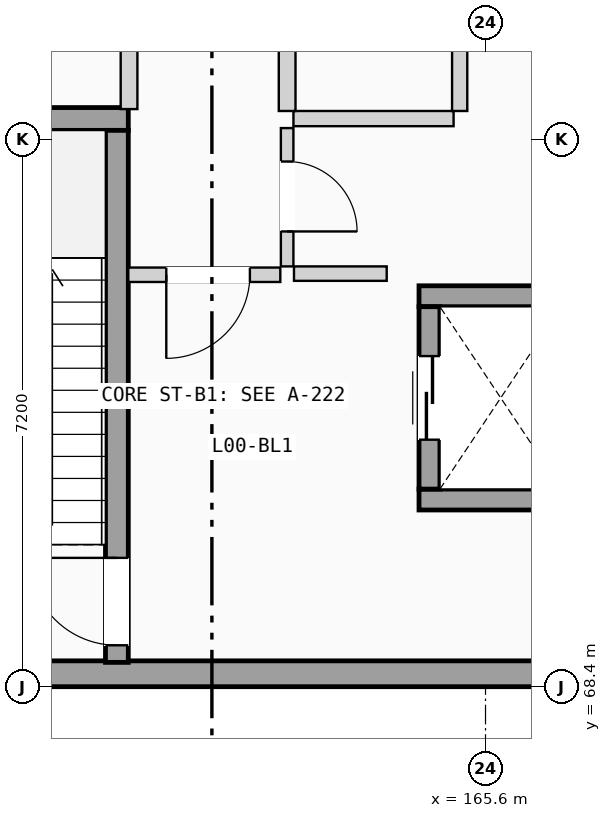
"""IFC4 building model, lengths in metres.
Left out: names, types, materials, properties, quantities, classifications, styles, units other than length and angle.
Written with IfcOpenShell. Run it as: python <this file> out.ifc"""

import sys

from ifc_helpers import new_model, si_unit, direction, frame, frame_2d, origin, place, context, subcontext, project, spatial, rectangle, extrude, element, fill, save


model = new_model("IFC4")
c1 = context("Model", 3, precision=1e-05, world=origin(), true_north=direction((0.0, 1.0)))
c2 = subcontext(c1, "Body", "Model", "MODEL_VIEW")
j1 = project(units=[si_unit("LENGTHUNIT", "METRE"), si_unit("PLANEANGLEUNIT", "RADIAN")], contexts=[c1])
p1 = place(None, origin())
s1 = spatial("IfcSite", under=j1, at=p1, CompositionType="ELEMENT")
p2 = place(p1, origin())
s2 = spatial("IfcBuilding", under=s1, at=p2, CompositionType="ELEMENT")
p3 = place(p2, origin())
s3 = spatial("IfcBuildingStorey", under=s2, at=p3, CompositionType="ELEMENT", Elevation=0.0)
p4 = place(p3, frame((151.2, 68.57, 0.0), z_axis=(0.0, 0.0, 1.0), x_axis=(1.0, 0.0, 0.0)))
e1 = element("IfcWall", 1, at=p4, inside=s3, PredefinedType="SOLIDWALL", context=c2, shape_type="SweptSolid", body=[
    extrude(rectangle(XDim=21.6, YDim=0.34, at=frame_2d((10.8, 0.0))), origin(), (0.0, 0.0, 1.0), 4.64),
])
p5 = place(p4, frame((7.25, 0.0, 0.0)))
e2 = element("IfcOpeningElement", 2, at=p5, cuts=e1, PredefinedType="OPENING", context=c2, shape_type="SweptSolid", body=[
    extrude(rectangle(XDim=1.3, YDim=2.2, at=frame_2d((0.65, 1.1))), frame((0.0, 0.18, 0.0), z_axis=(0.0, -1.0, 0.0), x_axis=(1.0, 0.0, 0.0)), (0.0, 0.0, 1.0), 0.36),
])
p6 = place(p3, frame((156.975, 75.87, 0.0), z_axis=(0.0, 0.0, 1.0), x_axis=(1.0, 0.0, 0.0)))
e3 = element("IfcWall", 3, at=p6, inside=s3, PredefinedType="SHEAR", context=c2, shape_type="SweptSolid", body=[
    extrude(rectangle(XDim=3.925, YDim=0.3, at=frame_2d((1.962, 0.0))), origin(), (0.0, 0.0, 1.0), 4.64),
])
p7 = place(p3, frame((160.75, 68.72, 0.0), z_axis=(0.0, 0.0, 1.0), x_axis=(0.0, 1.0, 0.0)))
e4 = element("IfcWall", 4, at=p7, inside=s3, PredefinedType="SHEAR", context=c2, shape_type="SweptSolid", body=[
    extrude(rectangle(XDim=7.0, YDim=0.3, at=frame_2d((3.5, 0.0))), origin(), (0.0, 0.0, 1.0), 4.64),
])
p8 = place(p7, frame((0.225, 0.0, 0.0)))
e5 = element("IfcOpeningElement", 5, at=p8, cuts=e4, PredefinedType="OPENING", context=c2, shape_type="SweptSolid", body=[
    extrude(rectangle(XDim=1.15, YDim=2.12, at=frame_2d((0.575, 1.06))), frame((0.0, 0.16, 0.0), z_axis=(0.0, -1.0, 0.0), x_axis=(1.0, 0.0, 0.0)), (0.0, 0.0, 1.0), 0.32),
])
for number, where, z_axis, x_axis in (
    (6, (164.725, 70.863, 0.0), (0.0, 0.0, 1.0), (1.0, 0.0, 0.0)),
    (7, (164.725, 73.538, 0.0), (0.0, 0.0, 1.0), (1.0, 0.0, 0.0)),
):
    element("IfcWall", number, at=place(p3, frame(where, z_axis=z_axis, x_axis=x_axis)), inside=s3, PredefinedType="SHEAR", context=c2, shape_type="SweptSolid", body=[
        extrude(rectangle(XDim=2.15, YDim=0.275, at=frame_2d((1.075, 0.0))), origin(), (0.0, 0.0, 1.0), 4.64),
    ])
p9 = place(p3, frame((164.863, 71.0, 0.0), z_axis=(0.0, 0.0, 1.0), x_axis=(0.0, 1.0, 0.0)))
e8 = element("IfcWall", 8, at=p9, inside=s3, PredefinedType="SHEAR", context=c2, shape_type="SweptSolid", body=[
    extrude(rectangle(XDim=2.4, YDim=0.275, at=frame_2d((1.2, 0.0))), origin(), (0.0, 0.0, 1.0), 4.64),
])
p10 = place(p9, frame((0.65, 0.0, 0.0)))
e9 = element("IfcOpeningElement", 9, at=p10, cuts=e8, PredefinedType="OPENING", context=c2, shape_type="SweptSolid", body=[
    extrude(rectangle(XDim=1.1, YDim=2.15, at=frame_2d((0.55, 1.075))), frame((0.0, 0.147, 0.0), z_axis=(0.0, -1.0, 0.0), x_axis=(1.0, 0.0, 0.0)), (0.0, 0.0, 1.0), 0.295),
])
p11 = place(p3, frame((163.08, 73.835, 0.0), z_axis=(0.0, 0.0, 1.0), x_axis=(1.0, 0.0, 0.0)))
e10 = element("IfcWall", 10, at=p11, inside=s3, PredefinedType="PARTITIONING", context=c2, shape_type="SweptSolid", body=[
    extrude(rectangle(XDim=1.22, YDim=0.19, at=frame_2d((0.61, 0.0))), origin(), (0.0, 0.0, 1.0), 3.84),
])
p12 = place(p3, frame((160.9, 73.82, 0.0), z_axis=(0.0, 0.0, 1.0), x_axis=(1.0, 0.0, 0.0)))
e11 = element("IfcWall", 11, at=p12, inside=s3, PredefinedType="PARTITIONING", context=c2, shape_type="SweptSolid", body=[
    extrude(rectangle(XDim=2.0, YDim=0.19, at=frame_2d((1.0, 0.0))), origin(), (0.0, 0.0, 1.0), 3.84),
])
p13 = place(p12, frame((0.5, 0.0, 0.0)))
e12 = element("IfcOpeningElement", 12, at=p13, cuts=e11, PredefinedType="OPENING", context=c2, shape_type="SweptSolid", body=[
    extrude(rectangle(XDim=1.1, YDim=2.12, at=frame_2d((0.55, 1.06))), frame((0.0, 0.105, 0.0), z_axis=(0.0, -1.0, 0.0), x_axis=(1.0, 0.0, 0.0)), (0.0, 0.0, 1.0), 0.21),
])
p14 = place(p3, frame((162.99, 73.93, 0.0), z_axis=(0.0, 0.0, 1.0), x_axis=(0.0, 1.0, 0.0)))
e13 = element("IfcWall", 13, at=p14, inside=s3, PredefinedType="PARTITIONING", context=c2, shape_type="SweptSolid", body=[
    extrude(rectangle(XDim=1.82, YDim=0.165, at=frame_2d((0.91, 0.0))), origin(), (0.0, 0.0, 1.0), 3.84),
])
p15 = place(p14, frame((0.46, 0.0, 0.0)))
e14 = element("IfcOpeningElement", 14, at=p15, cuts=e13, PredefinedType="OPENING", context=c2, shape_type="SweptSolid", body=[
    extrude(rectangle(XDim=0.92, YDim=2.04, at=frame_2d((0.46, 1.02))), frame((0.0, 0.093, 0.0), z_axis=(0.0, -1.0, 0.0), x_axis=(1.0, 0.0, 0.0)), (0.0, 0.0, 1.0), 0.185),
])
p16 = place(p3, frame((163.073, 75.875, 0.0), z_axis=(0.0, 0.0, 1.0), x_axis=(1.0, 0.0, 0.0)))
e15 = element("IfcWall", 15, at=p16, inside=s3, PredefinedType="PLUMBINGWALL", context=c2, shape_type="SweptSolid", body=[
    extrude(rectangle(XDim=2.107, YDim=0.2, at=frame_2d((1.053, 0.0))), origin(), (0.0, 0.0, 1.0), 3.84),
])
p17 = place(p3, frame((160.91, 76.0, 0.0), z_axis=(0.0, 0.0, 1.0), x_axis=(0.0, 1.0, 0.0)))
e16 = element("IfcWall", 16, at=p17, inside=s3, PredefinedType="PLUMBINGWALL", context=c2, shape_type="SweptSolid", body=[
    extrude(rectangle(XDim=3.493, YDim=0.22, at=frame_2d((1.747, 0.0))), origin(), (0.0, 0.0, 1.0), 3.84),
])
p18 = place(p3, frame((162.99, 75.975, 0.0), z_axis=(0.0, 0.0, 1.0), x_axis=(0.0, 1.0, 0.0)))
e17 = element("IfcWall", 17, at=p18, inside=s3, PredefinedType="PLUMBINGWALL", context=c2, shape_type="SweptSolid", body=[
    extrude(rectangle(XDim=3.518, YDim=0.22, at=frame_2d((1.759, 0.0))), origin(), (0.0, 0.0, 1.0), 3.84),
])
p19 = place(p3, frame((165.26, 75.975, 0.0), z_axis=(0.0, 0.0, 1.0), x_axis=(0.0, 1.0, 0.0)))
e18 = element("IfcWall", 18, at=p19, inside=s3, PredefinedType="PLUMBINGWALL", context=c2, shape_type="SweptSolid", body=[
    extrude(rectangle(XDim=3.518, YDim=0.2, at=frame_2d((1.759, 0.0))), origin(), (0.0, 0.0, 1.0), 3.84),
])
p20 = place(p8, origin())
e19 = element("IfcDoor", 19, at=p20, inside=s3, OperationType="SINGLE_SWING_RIGHT", PredefinedType="DOOR", context=c2, shape_type="SweptSolid", body=[
    extrude(rectangle(XDim=1.15, YDim=2.12, at=frame_2d((0.575, 1.06))), frame((0.0, 0.025, 0.0), z_axis=(0.0, -1.0, 0.0), x_axis=(1.0, 0.0, 0.0)), (0.0, 0.0, 1.0), 0.05),
])
fill(e5, e19)
p21 = place(p10, origin())
e20 = element("IfcDoor", 20, at=p21, inside=s3, OperationType="SLIDING_TO_LEFT", PredefinedType="DOOR", context=c2, shape_type="SweptSolid", body=[
    extrude(rectangle(XDim=1.1, YDim=2.15, at=frame_2d((0.55, 1.075))), frame((0.0, 0.025, 0.0), z_axis=(0.0, -1.0, 0.0), x_axis=(1.0, 0.0, 0.0)), (0.0, 0.0, 1.0), 0.05),
])
fill(e9, e20)
p22 = place(p13, frame((1.1, 0.0, 0.0), z_axis=(0.0, 0.0, 1.0), x_axis=(-1.0, 0.0, 0.0)))
e21 = element("IfcDoor", 21, at=p22, inside=s3, OperationType="SINGLE_SWING_LEFT", PredefinedType="DOOR", context=c2, shape_type="SweptSolid", body=[
    extrude(rectangle(XDim=1.1, YDim=2.12, at=frame_2d((0.55, 1.06))), frame((0.0, 0.025, 0.0), z_axis=(0.0, -1.0, 0.0), x_axis=(1.0, 0.0, 0.0)), (0.0, 0.0, 1.0), 0.05),
])
fill(e12, e21)
p23 = place(p15, frame((0.92, 0.0, 0.0), z_axis=(0.0, 0.0, 1.0), x_axis=(-1.0, 0.0, 0.0)))
e22 = element("IfcDoor", 22, at=p23, inside=s3, OperationType="SINGLE_SWING_LEFT", PredefinedType="DOOR", context=c2, shape_type="SweptSolid", body=[
    extrude(rectangle(XDim=0.92, YDim=2.04, at=frame_2d((0.46, 1.02))), frame((0.0, 0.025, 0.0), z_axis=(0.0, -1.0, 0.0), x_axis=(1.0, 0.0, 0.0)), (0.0, 0.0, 1.0), 0.05),
])
fill(e14, e22)
save(model, sys.argv[1])
